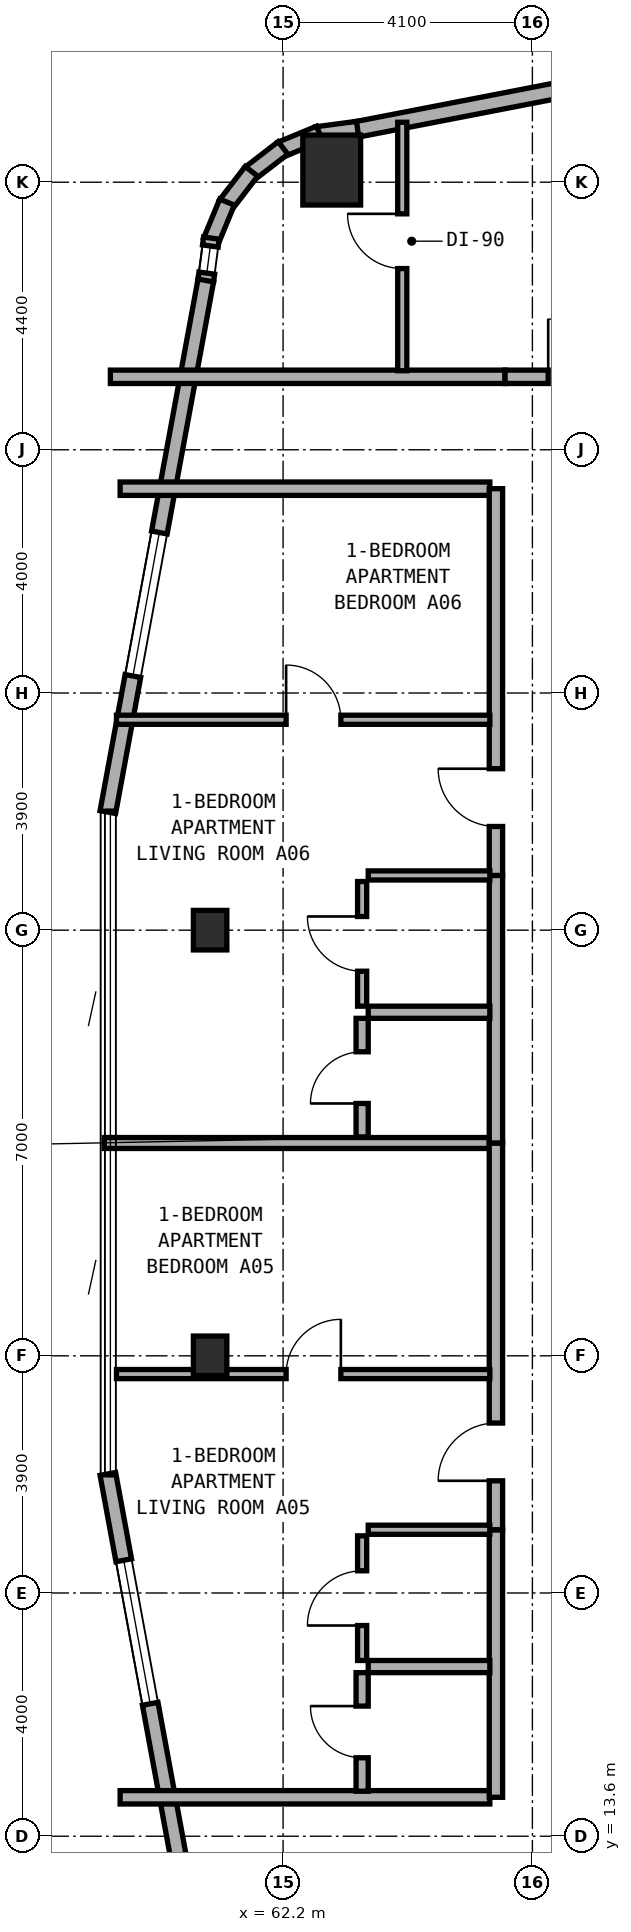
"""IFC4 building model, lengths in metres.
Left out: names, types, materials, properties, quantities, classifications, styles, units other than length and angle.
Written with IfcOpenShell. Run it as: python <this file> out.ifc"""

import sys

from ifc_helpers import new_model, si_unit, direction, frame, frame_2d, origin, origin_2d, place, context, subcontext, project, spatial, rectangle, extrude, element, fill, save


model = new_model("IFC4")
c1 = context("Model", 3, precision=1e-05, world=origin(), true_north=direction((0.0, 1.0)))
c2 = subcontext(c1, "Body", "Model", "MODEL_VIEW")
j1 = project(units=[si_unit("LENGTHUNIT", "METRE"), si_unit("PLANEANGLEUNIT", "RADIAN")], contexts=[c1])
p1 = place(None, origin())
s1 = spatial("IfcSite", under=j1, at=p1, CompositionType="ELEMENT")
p2 = place(p1, origin())
s2 = spatial("IfcBuilding", under=s1, at=p2, CompositionType="ELEMENT")
p3 = place(p2, frame((0.0, 0.0, 127.5)))
s3 = spatial("IfcBuildingStorey", under=s2, at=p3, CompositionType="ELEMENT", Elevation=127.5)
for number, where, z_axis, x_axis in (
    (1, (61.0, 21.5, 0.0), (0.0, 0.0, 1.0), (1.0, 0.0, 0.0)),
    (2, (61.0, 28.5, 0.0), (0.0, 0.0, 1.0), (1.0, 0.0, 0.0)),
):
    element("IfcColumn", number, at=place(p3, frame(where, z_axis=z_axis, x_axis=x_axis)), inside=s3, PredefinedType="COLUMN", context=c2, shape_type="SweptSolid", body=[
        extrude(rectangle(XDim=0.55, YDim=0.65, at=origin_2d()), origin(), (0.0, 0.0, 1.0), 3.24),
    ])
p4 = place(p3, frame((63.0, 41.0, 0.0), z_axis=(0.0, 0.0, 1.0), x_axis=(1.0, 0.0, 0.0)))
e3 = element("IfcColumn", 3, at=p4, inside=s3, PredefinedType="COLUMN", context=c2, shape_type="SweptSolid", body=[
    extrude(rectangle(XDim=0.95, YDim=1.15, at=origin_2d()), origin(), (0.0, 0.0, 1.0), 3.24),
])
p5 = place(p3, frame((71.739, 43.282, 0.0), z_axis=(0.0, 0.0, 1.0), x_axis=(-0.981750199588, -0.190175039396, 0.0)))
e4 = element("IfcWall", 4, at=p5, inside=s3, PredefinedType="STANDARD", context=c2, shape_type="SweptSolid", body=[
    extrude(rectangle(XDim=8.477, YDim=0.26, at=frame_2d((4.238, 0.0))), origin(), (0.0, 0.0, 1.0), 3.25),
])
p6 = place(p5, frame((2.623, 0.0, 0.8)))
e5 = element("IfcOpeningElement", 5, at=p6, cuts=e4, PredefinedType="OPENING", context=c2, shape_type="SweptSolid", body=[
    extrude(rectangle(XDim=2.4, YDim=1.6, at=frame_2d((1.2, 0.8))), frame((0.0, 0.14, 0.0), z_axis=(0.0, -1.0, 0.0), x_axis=(1.0, 0.0, 0.0)), (0.0, 0.0, 1.0), 0.28),
])
p7 = place(p3, frame((63.425, 41.672, 0.0), z_axis=(0.0, 0.0, 1.0), x_axis=(-0.991300187529, -0.13162043232, 0.0)))
e6 = element("IfcWall", 6, at=p7, inside=s3, PredefinedType="STANDARD", context=c2, shape_type="SweptSolid", body=[
    extrude(rectangle(XDim=0.677, YDim=0.26, at=frame_2d((0.338, 0.0))), origin(), (0.0, 0.0, 1.0), 3.25),
])
for number, where, z_axis, x_axis in (
    (7, (62.8, 41.601, 0.0), (0.0, 0.0, 1.0), (-0.924, -0.382, 0.0)),
    (8, (62.199, 41.364, 0.0), (0.0, 0.0, 1.0), (-0.793, -0.61, 0.0)),
    (9, (61.68, 40.979, 0.0), (0.0, 0.0, 1.0), (-0.609, -0.793, 0.0)),
):
    element("IfcWall", number, at=place(p3, frame(where, z_axis=z_axis, x_axis=x_axis)), inside=s3, PredefinedType="STANDARD", context=c2, shape_type="SweptSolid", body=[
        extrude(rectangle(XDim=0.694, YDim=0.26, at=frame_2d((0.347, 0.0))), origin(), (0.0, 0.0, 1.0), 3.25),
    ])
p8 = place(p3, frame((61.278, 40.473, 0.0), z_axis=(0.0, 0.0, 1.0), x_axis=(-0.382289608286, -0.924042561464, 0.0)))
e10 = element("IfcWall", 10, at=p8, inside=s3, PredefinedType="STANDARD", context=c2, shape_type="SweptSolid", body=[
    extrude(rectangle(XDim=0.694, YDim=0.26, at=frame_2d((0.347, 0.0))), origin(), (0.0, 0.0, 1.0), 3.25),
])
p9 = place(p3, frame((61.021, 39.881, 0.0), z_axis=(0.0, 0.0, 1.0), x_axis=(-0.130614135366, -0.991433279471, 0.0)))
e11 = element("IfcWall", 11, at=p9, inside=s3, PredefinedType="STANDARD", context=c2, shape_type="SweptSolid", body=[
    extrude(rectangle(XDim=0.712, YDim=0.26, at=frame_2d((0.356, 0.0))), origin(), (0.0, 0.0, 1.0), 3.25),
])
p10 = place(p9, frame((0.131, 0.0, 0.85)))
e12 = element("IfcOpeningElement", 12, at=p10, cuts=e11, PredefinedType="OPENING", context=c2, shape_type="SweptSolid", body=[
    extrude(rectangle(XDim=0.45, YDim=1.5, at=frame_2d((0.225, 0.75))), frame((0.0, 0.14, 0.0), z_axis=(0.0, -1.0, 0.0), x_axis=(1.0, 0.0, 0.0)), (0.0, 0.0, 1.0), 0.28),
])
p11 = place(p3, frame((60.929, 39.184, 0.0), z_axis=(0.0, 0.0, 1.0), x_axis=(-0.181209963057, -0.983444431215, 0.0)))
e13 = element("IfcWall", 13, at=p11, inside=s3, PredefinedType="STANDARD", context=c2, shape_type="SweptSolid", body=[
    extrude(rectangle(XDim=8.889, YDim=0.26, at=frame_2d((4.445, 0.0))), origin(), (0.0, 0.0, 1.0), 3.25),
])
p12 = place(p11, frame((4.214, 0.0, 0.8)))
e14 = element("IfcOpeningElement", 14, at=p12, cuts=e13, PredefinedType="OPENING", context=c2, shape_type="SweptSolid", body=[
    extrude(rectangle(XDim=2.4, YDim=1.6, at=frame_2d((1.2, 0.8))), frame((0.0, 0.14, 0.0), z_axis=(0.0, -1.0, 0.0), x_axis=(1.0, 0.0, 0.0)), (0.0, 0.0, 1.0), 0.28),
])
p13 = place(p3, frame((59.318, 19.558, 0.0), z_axis=(0.0, 0.0, 1.0), x_axis=(0.181209963057, -0.983444431215, 0.0)))
e15 = element("IfcWall", 15, at=p13, inside=s3, PredefinedType="STANDARD", context=c2, shape_type="SweptSolid", body=[
    extrude(rectangle(XDim=8.889, YDim=0.26, at=frame_2d((4.445, 0.0))), origin(), (0.0, 0.0, 1.0), 3.25),
])
p14 = place(p13, frame((1.444, 0.0, 0.8)))
e16 = element("IfcOpeningElement", 16, at=p14, cuts=e15, PredefinedType="OPENING", context=c2, shape_type="SweptSolid", body=[
    extrude(rectangle(XDim=2.4, YDim=1.6, at=frame_2d((1.2, 0.8))), frame((0.0, 0.14, 0.0), z_axis=(0.0, -1.0, 0.0), x_axis=(1.0, 0.0, 0.0)), (0.0, 0.0, 1.0), 0.28),
])
p15 = place(p3, frame((59.36, 37.6, 0.0), z_axis=(0.0, 0.0, 1.0), x_axis=(1.0, 0.0, 0.0)))
e17 = element("IfcWall", 17, at=p15, inside=s3, PredefinedType="SOLIDWALL", context=c2, shape_type="SweptSolid", body=[
    extrude(rectangle(XDim=6.49, YDim=0.22, at=frame_2d((3.245, 0.0))), origin(), (0.0, 0.0, 1.0), 2.815),
])
p16 = place(p3, frame((65.85, 37.6, 0.0), z_axis=(0.0, 0.0, 1.0), x_axis=(1.0, 0.0, 0.0)))
e18 = element("IfcWall", 18, at=p16, inside=s3, PredefinedType="SOLIDWALL", context=c2, shape_type="SweptSolid", body=[
    extrude(rectangle(XDim=2.37, YDim=0.22, at=frame_2d((1.185, 0.0))), origin(), (0.0, 0.0, 1.0), 3.22),
])
p17 = place(p16, frame((0.71, 0.0, 0.0)))
e19 = element("IfcOpeningElement", 19, at=p17, cuts=e18, PredefinedType="OPENING", context=c2, shape_type="SweptSolid", body=[
    extrude(rectangle(XDim=0.95, YDim=2.1, at=frame_2d((0.475, 1.05))), frame((0.0, 0.12, 0.0), z_axis=(0.0, -1.0, 0.0), x_axis=(1.0, 0.0, 0.0)), (0.0, 0.0, 1.0), 0.24),
])
p18 = place(p3, frame((64.16, 37.7, 0.0), z_axis=(0.0, 0.0, 1.0), x_axis=(0.0, 1.0, 0.0)))
e20 = element("IfcWall", 20, at=p18, inside=s3, PredefinedType="PARTITIONING", context=c2, shape_type="SweptSolid", body=[
    extrude(rectangle(XDim=4.086, YDim=0.15, at=frame_2d((2.043, 0.0))), origin(), (0.0, 0.0, 1.0), 3.22),
])
p19 = place(p18, frame((1.68, 0.0, 0.0)))
e21 = element("IfcOpeningElement", 21, at=p19, cuts=e20, PredefinedType="OPENING", context=c2, shape_type="SweptSolid", body=[
    extrude(rectangle(XDim=0.9, YDim=2.1, at=frame_2d((0.45, 1.05))), frame((0.0, 0.085, 0.0), z_axis=(0.0, -1.0, 0.0), x_axis=(1.0, 0.0, 0.0)), (0.0, 0.0, 1.0), 0.17),
])
for number, where, z_axis, x_axis in (
    (22, (59.52, 14.24, 0.0), (0.0, 0.0, 1.0), (1.0, 0.0, 0.0)),
    (23, (59.52, 35.76, 0.0), (0.0, 0.0, 1.0), (1.0, 0.0, 0.0)),
):
    element("IfcWall", number, at=place(p3, frame(where, z_axis=z_axis, x_axis=x_axis)), inside=s3, PredefinedType="SOLIDWALL", context=c2, shape_type="SweptSolid", body=[
        extrude(rectangle(XDim=6.08, YDim=0.22, at=frame_2d((3.04, 0.0))), origin(), (0.0, 0.0, 1.0), 2.815),
    ])
p20 = place(p3, frame((59.26, 25.0, 0.0), z_axis=(0.0, 0.0, 1.0), x_axis=(1.0, 0.0, 0.0)))
e24 = element("IfcWall", 24, at=p20, inside=s3, PredefinedType="SOLIDWALL", context=c2, shape_type="SweptSolid", body=[
    extrude(rectangle(XDim=6.44, YDim=0.18, at=frame_2d((3.22, 0.0))), origin(), (0.0, 0.0, 1.0), 2.815),
])
p21 = place(p3, frame((65.7, 14.24, 0.0), z_axis=(0.0, 0.0, 1.0), x_axis=(0.0, 1.0, 0.0)))
e25 = element("IfcWall", 25, at=p21, inside=s3, PredefinedType="SOLIDWALL", context=c2, shape_type="SweptSolid", body=[
    extrude(rectangle(XDim=4.4, YDim=0.22, at=frame_2d((2.2, 0.0))), origin(), (0.0, 0.0, 1.0), 3.22),
])
p22 = place(p3, frame((65.7, 18.64, 0.0), z_axis=(0.0, 0.0, 1.0), x_axis=(0.0, 1.0, 0.0)))
e26 = element("IfcWall", 26, at=p22, inside=s3, PredefinedType="SOLIDWALL", context=c2, shape_type="SweptSolid", body=[
    extrude(rectangle(XDim=6.36, YDim=0.22, at=frame_2d((3.18, 0.0))), origin(), (0.0, 0.0, 1.0), 2.815),
])
p23 = place(p22, frame((0.805, 0.0, 0.0)))
e27 = element("IfcOpeningElement", 27, at=p23, cuts=e26, PredefinedType="OPENING", context=c2, shape_type="SweptSolid", body=[
    extrude(rectangle(XDim=0.95, YDim=2.1, at=frame_2d((0.475, 1.05))), frame((0.0, 0.12, 0.0), z_axis=(0.0, -1.0, 0.0), x_axis=(1.0, 0.0, 0.0)), (0.0, 0.0, 1.0), 0.24),
])
p24 = place(p3, frame((59.46, 21.2, 0.0), z_axis=(0.0, 0.0, 1.0), x_axis=(1.0, 0.0, 0.0)))
e28 = element("IfcWall", 28, at=p24, inside=s3, PredefinedType="PARTITIONING", context=c2, shape_type="SweptSolid", body=[
    extrude(rectangle(XDim=6.14, YDim=0.15, at=frame_2d((3.07, 0.0))), origin(), (0.0, 0.0, 1.0), 2.815),
])
p25 = place(p24, frame((2.79, 0.0, 0.0)))
e29 = element("IfcOpeningElement", 29, at=p25, cuts=e28, PredefinedType="OPENING", context=c2, shape_type="SweptSolid", body=[
    extrude(rectangle(XDim=0.9, YDim=2.1, at=frame_2d((0.45, 1.05))), frame((0.0, 0.085, 0.0), z_axis=(0.0, -1.0, 0.0), x_axis=(1.0, 0.0, 0.0)), (0.0, 0.0, 1.0), 0.17),
])
p26 = place(p3, frame((63.6, 16.39, 0.0), z_axis=(0.0, 0.0, 1.0), x_axis=(1.0, 0.0, 0.0)))
e30 = element("IfcWall", 30, at=p26, inside=s3, PredefinedType="PLUMBINGWALL", context=c2, shape_type="SweptSolid", body=[
    extrude(rectangle(XDim=2.0, YDim=0.2, at=frame_2d((1.0, 0.0))), origin(), (0.0, 0.0, 1.0), 3.22),
])
p27 = place(p3, frame((63.6, 18.64, 0.0), z_axis=(0.0, 0.0, 1.0), x_axis=(1.0, 0.0, 0.0)))
e31 = element("IfcWall", 31, at=p27, inside=s3, PredefinedType="PARTITIONING", context=c2, shape_type="SweptSolid", body=[
    extrude(rectangle(XDim=2.0, YDim=0.15, at=frame_2d((1.0, 0.0))), origin(), (0.0, 0.0, 1.0), 3.22),
])
p28 = place(p3, frame((63.5, 14.34, 0.0), z_axis=(0.0, 0.0, 1.0), x_axis=(0.0, 1.0, 0.0)))
e32 = element("IfcWall", 32, at=p28, inside=s3, PredefinedType="PLUMBINGWALL", context=c2, shape_type="SweptSolid", body=[
    extrude(rectangle(XDim=1.95, YDim=0.2, at=frame_2d((0.975, 0.0))), origin(), (0.0, 0.0, 1.0), 3.22),
])
p29 = place(p28, frame((0.55, 0.0, 0.0)))
e33 = element("IfcOpeningElement", 33, at=p29, cuts=e32, PredefinedType="OPENING", context=c2, shape_type="SweptSolid", body=[
    extrude(rectangle(XDim=0.85, YDim=2.1, at=frame_2d((0.425, 1.05))), frame((0.0, 0.11, 0.0), z_axis=(0.0, -1.0, 0.0), x_axis=(1.0, 0.0, 0.0)), (0.0, 0.0, 1.0), 0.22),
])
p30 = place(p3, frame((63.5, 16.49, 0.0), z_axis=(0.0, 0.0, 1.0), x_axis=(0.0, 1.0, 0.0)))
e34 = element("IfcWall", 34, at=p30, inside=s3, PredefinedType="PARTITIONING", context=c2, shape_type="SweptSolid", body=[
    extrude(rectangle(XDim=2.05, YDim=0.15, at=frame_2d((1.025, 0.0))), origin(), (0.0, 0.0, 1.0), 3.22),
])
p31 = place(p30, frame((0.575, 0.0, 0.0)))
e35 = element("IfcOpeningElement", 35, at=p31, cuts=e34, PredefinedType="OPENING", context=c2, shape_type="SweptSolid", body=[
    extrude(rectangle(XDim=0.9, YDim=2.1, at=frame_2d((0.45, 1.05))), frame((0.0, 0.085, 0.0), z_axis=(0.0, -1.0, 0.0), x_axis=(1.0, 0.0, 0.0)), (0.0, 0.0, 1.0), 0.17),
])
p32 = place(p3, frame((65.7, 25.0, 0.0), z_axis=(0.0, 0.0, 1.0), x_axis=(0.0, 1.0, 0.0)))
e36 = element("IfcWall", 36, at=p32, inside=s3, PredefinedType="SOLIDWALL", context=c2, shape_type="SweptSolid", body=[
    extrude(rectangle(XDim=4.4, YDim=0.22, at=frame_2d((2.2, 0.0))), origin(), (0.0, 0.0, 1.0), 2.815),
])
p33 = place(p3, frame((65.7, 29.4, 0.0), z_axis=(0.0, 0.0, 1.0), x_axis=(0.0, 1.0, 0.0)))
e37 = element("IfcWall", 37, at=p33, inside=s3, PredefinedType="SOLIDWALL", context=c2, shape_type="SweptSolid", body=[
    extrude(rectangle(XDim=6.36, YDim=0.22, at=frame_2d((3.18, 0.0))), origin(), (0.0, 0.0, 1.0), 3.22),
])
p34 = place(p33, frame((0.805, 0.0, 0.0)))
e38 = element("IfcOpeningElement", 38, at=p34, cuts=e37, PredefinedType="OPENING", context=c2, shape_type="SweptSolid", body=[
    extrude(rectangle(XDim=0.95, YDim=2.1, at=frame_2d((0.475, 1.05))), frame((0.0, 0.12, 0.0), z_axis=(0.0, -1.0, 0.0), x_axis=(1.0, 0.0, 0.0)), (0.0, 0.0, 1.0), 0.24),
])
p35 = place(p3, frame((59.46, 31.96, 0.0), z_axis=(0.0, 0.0, 1.0), x_axis=(1.0, 0.0, 0.0)))
e39 = element("IfcWall", 39, at=p35, inside=s3, PredefinedType="PARTITIONING", context=c2, shape_type="SweptSolid", body=[
    extrude(rectangle(XDim=6.14, YDim=0.15, at=frame_2d((3.07, 0.0))), origin(), (0.0, 0.0, 1.0), 2.815),
])
p36 = place(p35, frame((2.79, 0.0, 0.0)))
e40 = element("IfcOpeningElement", 40, at=p36, cuts=e39, PredefinedType="OPENING", context=c2, shape_type="SweptSolid", body=[
    extrude(rectangle(XDim=0.9, YDim=2.1, at=frame_2d((0.45, 1.05))), frame((0.0, 0.085, 0.0), z_axis=(0.0, -1.0, 0.0), x_axis=(1.0, 0.0, 0.0)), (0.0, 0.0, 1.0), 0.17),
])
p37 = place(p3, frame((63.6, 27.15, 0.0), z_axis=(0.0, 0.0, 1.0), x_axis=(1.0, 0.0, 0.0)))
e41 = element("IfcWall", 41, at=p37, inside=s3, PredefinedType="PLUMBINGWALL", context=c2, shape_type="SweptSolid", body=[
    extrude(rectangle(XDim=2.0, YDim=0.2, at=frame_2d((1.0, 0.0))), origin(), (0.0, 0.0, 1.0), 3.22),
])
p38 = place(p3, frame((63.6, 29.4, 0.0), z_axis=(0.0, 0.0, 1.0), x_axis=(1.0, 0.0, 0.0)))
e42 = element("IfcWall", 42, at=p38, inside=s3, PredefinedType="PARTITIONING", context=c2, shape_type="SweptSolid", body=[
    extrude(rectangle(XDim=2.0, YDim=0.15, at=frame_2d((1.0, 0.0))), origin(), (0.0, 0.0, 1.0), 3.22),
])
p39 = place(p3, frame((63.5, 25.1, 0.0), z_axis=(0.0, 0.0, 1.0), x_axis=(0.0, 1.0, 0.0)))
e43 = element("IfcWall", 43, at=p39, inside=s3, PredefinedType="PLUMBINGWALL", context=c2, shape_type="SweptSolid", body=[
    extrude(rectangle(XDim=1.95, YDim=0.2, at=frame_2d((0.975, 0.0))), origin(), (0.0, 0.0, 1.0), 3.22),
])
p40 = place(p39, frame((0.55, 0.0, 0.0)))
e44 = element("IfcOpeningElement", 44, at=p40, cuts=e43, PredefinedType="OPENING", context=c2, shape_type="SweptSolid", body=[
    extrude(rectangle(XDim=0.85, YDim=2.1, at=frame_2d((0.425, 1.05))), frame((0.0, 0.11, 0.0), z_axis=(0.0, -1.0, 0.0), x_axis=(1.0, 0.0, 0.0)), (0.0, 0.0, 1.0), 0.22),
])
p41 = place(p3, frame((63.5, 27.25, 0.0), z_axis=(0.0, 0.0, 1.0), x_axis=(0.0, 1.0, 0.0)))
e45 = element("IfcWall", 45, at=p41, inside=s3, PredefinedType="PARTITIONING", context=c2, shape_type="SweptSolid", body=[
    extrude(rectangle(XDim=2.05, YDim=0.15, at=frame_2d((1.025, 0.0))), origin(), (0.0, 0.0, 1.0), 2.815),
])
p42 = place(p41, frame((0.575, 0.0, 0.0)))
e46 = element("IfcOpeningElement", 46, at=p42, cuts=e45, PredefinedType="OPENING", context=c2, shape_type="SweptSolid", body=[
    extrude(rectangle(XDim=0.9, YDim=2.1, at=frame_2d((0.45, 1.05))), frame((0.0, 0.085, 0.0), z_axis=(0.0, -1.0, 0.0), x_axis=(1.0, 0.0, 0.0)), (0.0, 0.0, 1.0), 0.17),
])
p43 = place(p12, origin())
e47 = element("IfcWindow", 47, at=p43, inside=s3, PartitioningType="SINGLE_PANEL", PredefinedType="WINDOW", context=c2, shape_type="SweptSolid", body=[
    extrude(rectangle(XDim=2.4, YDim=1.6, at=frame_2d((1.2, 0.8))), frame((0.0, 0.03, 0.0), z_axis=(0.0, -1.0, 0.0), x_axis=(1.0, 0.0, 0.0)), (0.0, 0.0, 1.0), 0.06),
])
fill(e14, e47)
p44 = place(p14, origin())
e48 = element("IfcWindow", 48, at=p44, inside=s3, PartitioningType="SINGLE_PANEL", PredefinedType="WINDOW", context=c2, shape_type="SweptSolid", body=[
    extrude(rectangle(XDim=2.4, YDim=1.6, at=frame_2d((1.2, 0.8))), frame((0.0, 0.03, 0.0), z_axis=(0.0, -1.0, 0.0), x_axis=(1.0, 0.0, 0.0)), (0.0, 0.0, 1.0), 0.06),
])
fill(e16, e48)
p45 = place(p10, origin())
e49 = element("IfcWindow", 49, at=p45, inside=s3, PartitioningType="SINGLE_PANEL", PredefinedType="WINDOW", context=c2, shape_type="SweptSolid", body=[
    extrude(rectangle(XDim=0.45, YDim=1.5, at=frame_2d((0.225, 0.75))), frame((0.0, 0.03, 0.0), z_axis=(0.0, -1.0, 0.0), x_axis=(1.0, 0.0, 0.0)), (0.0, 0.0, 1.0), 0.06),
])
fill(e12, e49)
p46 = place(p17, origin())
e50 = element("IfcDoor", 50, at=p46, inside=s3, OperationType="SINGLE_SWING_LEFT", PredefinedType="DOOR", context=c2, shape_type="SweptSolid", body=[
    extrude(rectangle(XDim=0.95, YDim=2.1, at=frame_2d((0.475, 1.05))), frame((0.0, 0.025, 0.0), z_axis=(0.0, -1.0, 0.0), x_axis=(1.0, 0.0, 0.0)), (0.0, 0.0, 1.0), 0.05),
])
fill(e19, e50)
p47 = place(p19, origin())
e51 = element("IfcDoor", 51, at=p47, inside=s3, OperationType="SINGLE_SWING_RIGHT", PredefinedType="DOOR", context=c2, shape_type="SweptSolid", body=[
    extrude(rectangle(XDim=0.9, YDim=2.1, at=frame_2d((0.45, 1.05))), frame((0.0, 0.025, 0.0), z_axis=(0.0, -1.0, 0.0), x_axis=(1.0, 0.0, 0.0)), (0.0, 0.0, 1.0), 0.05),
])
fill(e21, e51)
p48 = place(p23, origin())
e52 = element("IfcDoor", 52, at=p48, inside=s3, OperationType="SINGLE_SWING_LEFT", PredefinedType="DOOR", context=c2, shape_type="SweptSolid", body=[
    extrude(rectangle(XDim=0.95, YDim=2.1, at=frame_2d((0.475, 1.05))), frame((0.0, 0.025, 0.0), z_axis=(0.0, -1.0, 0.0), x_axis=(1.0, 0.0, 0.0)), (0.0, 0.0, 1.0), 0.05),
])
fill(e27, e52)
p49 = place(p25, origin())
e53 = element("IfcDoor", 53, at=p49, inside=s3, OperationType="SINGLE_SWING_RIGHT", PredefinedType="DOOR", context=c2, shape_type="SweptSolid", body=[
    extrude(rectangle(XDim=0.9, YDim=2.1, at=frame_2d((0.45, 1.05))), frame((0.0, 0.025, 0.0), z_axis=(0.0, -1.0, 0.0), x_axis=(1.0, 0.0, 0.0)), (0.0, 0.0, 1.0), 0.05),
])
fill(e29, e53)
p50 = place(p29, origin())
e54 = element("IfcDoor", 54, at=p50, inside=s3, OperationType="SINGLE_SWING_RIGHT", PredefinedType="DOOR", context=c2, shape_type="SweptSolid", body=[
    extrude(rectangle(XDim=0.85, YDim=2.1, at=frame_2d((0.425, 1.05))), frame((0.0, 0.025, 0.0), z_axis=(0.0, -1.0, 0.0), x_axis=(1.0, 0.0, 0.0)), (0.0, 0.0, 1.0), 0.05),
])
fill(e33, e54)
p51 = place(p31, origin())
e55 = element("IfcDoor", 55, at=p51, inside=s3, OperationType="SINGLE_SWING_LEFT", PredefinedType="DOOR", context=c2, shape_type="SweptSolid", body=[
    extrude(rectangle(XDim=0.9, YDim=2.1, at=frame_2d((0.45, 1.05))), frame((0.0, 0.025, 0.0), z_axis=(0.0, -1.0, 0.0), x_axis=(1.0, 0.0, 0.0)), (0.0, 0.0, 1.0), 0.05),
])
fill(e35, e55)
p52 = place(p34, origin())
e56 = element("IfcDoor", 56, at=p52, inside=s3, OperationType="SINGLE_SWING_RIGHT", PredefinedType="DOOR", context=c2, shape_type="SweptSolid", body=[
    extrude(rectangle(XDim=0.95, YDim=2.1, at=frame_2d((0.475, 1.05))), frame((0.0, 0.025, 0.0), z_axis=(0.0, -1.0, 0.0), x_axis=(1.0, 0.0, 0.0)), (0.0, 0.0, 1.0), 0.05),
])
fill(e38, e56)
p53 = place(p36, origin())
e57 = element("IfcDoor", 57, at=p53, inside=s3, OperationType="SINGLE_SWING_LEFT", PredefinedType="DOOR", context=c2, shape_type="SweptSolid", body=[
    extrude(rectangle(XDim=0.9, YDim=2.1, at=frame_2d((0.45, 1.05))), frame((0.0, 0.025, 0.0), z_axis=(0.0, -1.0, 0.0), x_axis=(1.0, 0.0, 0.0)), (0.0, 0.0, 1.0), 0.05),
])
fill(e40, e57)
p54 = place(p40, origin())
e58 = element("IfcDoor", 58, at=p54, inside=s3, OperationType="SINGLE_SWING_LEFT", PredefinedType="DOOR", context=c2, shape_type="SweptSolid", body=[
    extrude(rectangle(XDim=0.85, YDim=2.1, at=frame_2d((0.425, 1.05))), frame((0.0, 0.025, 0.0), z_axis=(0.0, -1.0, 0.0), x_axis=(1.0, 0.0, 0.0)), (0.0, 0.0, 1.0), 0.05),
])
fill(e44, e58)
p55 = place(p42, origin())
e59 = element("IfcDoor", 59, at=p55, inside=s3, OperationType="SINGLE_SWING_RIGHT", PredefinedType="DOOR", context=c2, shape_type="SweptSolid", body=[
    extrude(rectangle(XDim=0.9, YDim=2.1, at=frame_2d((0.45, 1.05))), frame((0.0, 0.025, 0.0), z_axis=(0.0, -1.0, 0.0), x_axis=(1.0, 0.0, 0.0)), (0.0, 0.0, 1.0), 0.05),
])
fill(e46, e59)
save(model, sys.argv[1])
